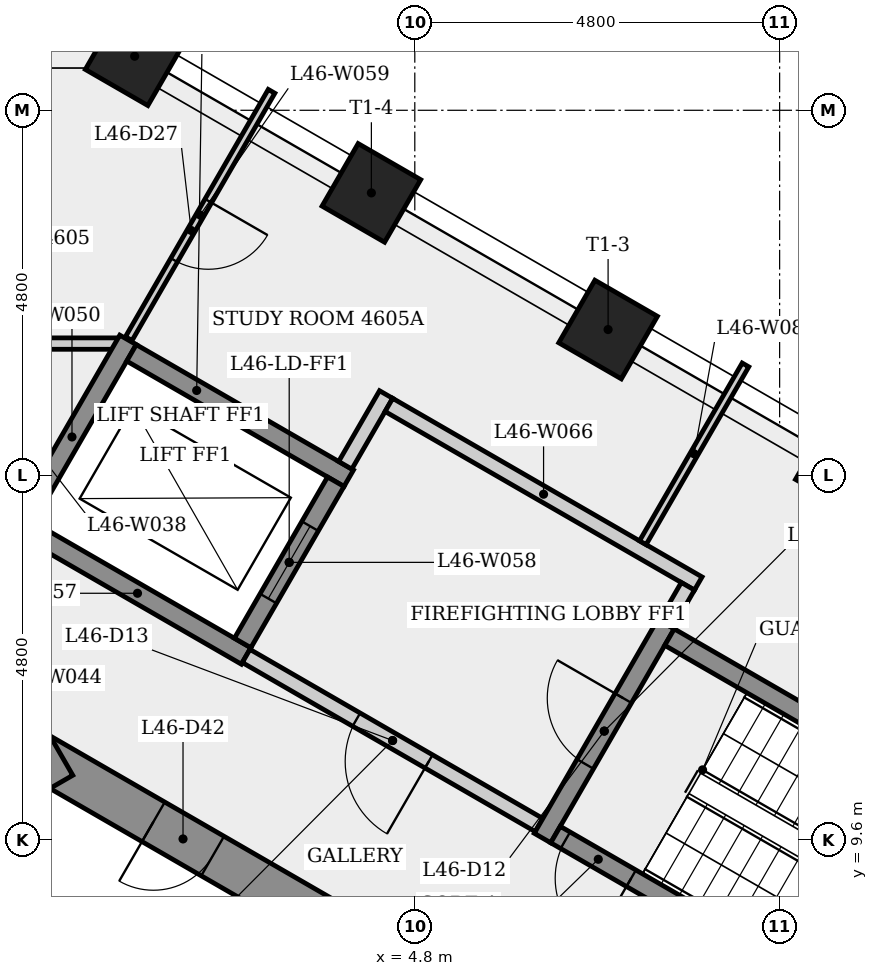
"""IFC4 building model, lengths in metres.
Left out: names, types, materials, properties, quantities, classifications, styles, units other than length and angle.
Written with IfcOpenShell. Run it as: python <this file> out.ifc"""

import sys

from ifc_helpers import new_model, si_unit, direction, frame, frame_2d, origin, origin_2d, place, context, subcontext, project, spatial, rectangle, extrude, element, fill, save


model = new_model("IFC4")
c1 = context("Model", 3, precision=1e-05, world=origin(), true_north=direction((0.0, 1.0)))
c2 = subcontext(c1, "Body", "Model", "MODEL_VIEW")
j1 = project(units=[si_unit("LENGTHUNIT", "METRE"), si_unit("PLANEANGLEUNIT", "RADIAN")], contexts=[c1])
p1 = place(None, origin())
s1 = spatial("IfcSite", under=j1, at=p1, CompositionType="ELEMENT")
p2 = place(p1, origin())
s2 = spatial("IfcBuilding", under=s1, at=p2, CompositionType="ELEMENT")
p3 = place(p2, frame((0.0, 0.0, 173.1)))
s3 = spatial("IfcBuildingStorey", under=s2, at=p3, CompositionType="ELEMENT", Elevation=173.1)
p4 = place(p3, frame((9.35, 5.225, 0.0), z_axis=(0.0, 0.0, 1.0), x_axis=(-0.866023993627, 0.500002442456, 0.0)))
e1 = element("IfcWall", 1, at=p4, inside=s3, PredefinedType="SHEAR", context=c2, shape_type="SweptSolid", body=[
    extrude(rectangle(XDim=10.97, YDim=0.6, at=frame_2d((5.485, 0.0))), origin(), (0.0, 0.0, 1.0), 3.4),
])
p5 = place(p4, frame((8.325, 0.0, 0.0)))
e2 = element("IfcOpeningElement", 2, at=p5, cuts=e1, PredefinedType="OPENING", context=c2, shape_type="SweptSolid", body=[
    extrude(rectangle(XDim=0.9, YDim=2.1, at=frame_2d((0.45, 1.05))), frame((0.0, 0.31, 0.0), z_axis=(0.0, -1.0, 0.0), x_axis=(1.0, 0.0, 0.0)), (0.0, 0.0, 1.0), 0.62),
])
p6 = place(p4, frame((1.518, 0.0, 0.0)))
e3 = element("IfcOpeningElement", 3, at=p6, cuts=e1, PredefinedType="OPENING", context=c2, shape_type="SweptSolid", body=[
    extrude(rectangle(XDim=0.9, YDim=2.1, at=frame_2d((0.45, 1.05))), frame((0.0, 0.31, 0.0), z_axis=(0.0, -1.0, 0.0), x_axis=(1.0, 0.0, 0.0)), (0.0, 0.0, 1.0), 0.62),
])
p7 = place(p3, frame((0.15, 10.71, 0.0), z_axis=(0.0, 0.0, 1.0), x_axis=(-0.866023993627, -0.500002442456, 0.0)))
e4 = element("IfcWall", 4, at=p7, inside=s3, PredefinedType="SHEAR", context=c2, shape_type="SweptSolid", body=[
    extrude(rectangle(XDim=10.97, YDim=0.6, at=frame_2d((5.485, 0.0))), origin(), (0.0, 0.0, 1.0), 3.4),
])
p8 = place(p7, frame((9.013, 0.0, 0.0)))
e5 = element("IfcOpeningElement", 5, at=p8, cuts=e4, PredefinedType="OPENING", context=c2, shape_type="SweptSolid", body=[
    extrude(rectangle(XDim=0.9, YDim=2.1, at=frame_2d((0.45, 1.05))), frame((0.0, 0.31, 0.0), z_axis=(0.0, -1.0, 0.0), x_axis=(1.0, 0.0, 0.0)), (0.0, 0.0, 1.0), 0.62),
])
p9 = place(p7, frame((2.437, 0.0, 0.0)))
e6 = element("IfcOpeningElement", 6, at=p9, cuts=e4, PredefinedType="OPENING", context=c2, shape_type="SweptSolid", body=[
    extrude(rectangle(XDim=0.9, YDim=2.1, at=frame_2d((0.45, 1.05))), frame((0.0, 0.31, 0.0), z_axis=(0.0, -1.0, 0.0), x_axis=(1.0, 0.0, 0.0)), (0.0, 0.0, 1.0), 0.62),
])
for number, where, z_axis, x_axis in (
    (7, (10.458, 14.517, 0.0), (0.0, 0.0, 1.0), (0.5, 0.866, 0.0)),
    (8, (7.343, 16.315, 0.0), (0.0, 0.0, 1.0), (0.5, 0.866, 0.0)),
    (9, (4.229, 18.113, 0.0), (0.0, 0.0, 1.0), (0.5, 0.866, 0.0)),
    (10, (1.114, 19.911, 0.0), (0.0, 0.0, 1.0), (0.5, 0.866, 0.0)),
):
    element("IfcColumn", number, at=place(p3, frame(where, z_axis=z_axis, x_axis=x_axis)), inside=s3, PredefinedType="COLUMN", context=c2, shape_type="SweptSolid", body=[
        extrude(rectangle(XDim=0.95, YDim=0.95, at=origin_2d()), origin(), (0.0, 0.0, 1.0), 3.4),
    ])
p10 = place(p3, frame((-3.598, 16.13, 0.0), z_axis=(0.0, 0.0, 1.0), x_axis=(1.0, 0.0, 0.0)))
e11 = element("IfcWall", 11, at=p10, inside=s3, PredefinedType="PARTITIONING", context=c2, shape_type="SweptSolid", body=[
    extrude(rectangle(XDim=4.672, YDim=0.15, at=frame_2d((2.336, 0.0))), origin(), (0.0, 0.0, 1.0), 3.05),
])
p11 = place(p10, frame((1.836, 0.0, 0.0)))
e12 = element("IfcOpeningElement", 12, at=p11, cuts=e11, PredefinedType="OPENING", context=c2, shape_type="SweptSolid", body=[
    extrude(rectangle(XDim=1.0, YDim=2.1, at=frame_2d((0.5, 1.05))), frame((0.0, 0.085, 0.0), z_axis=(0.0, -1.0, 0.0), x_axis=(1.0, 0.0, 0.0)), (0.0, 0.0, 1.0), 0.17),
])
p12 = place(p3, frame((-0.448, 13.624, 0.0), z_axis=(0.0, 0.0, 1.0), x_axis=(0.500037662692, 0.866003658127, 0.0)))
e13 = element("IfcWall", 13, at=p12, inside=s3, PredefinedType="SHEAR", context=c2, shape_type="SweptSolid", body=[
    extrude(rectangle(XDim=2.95, YDim=0.25, at=frame_2d((1.475, 0.0))), origin(), (0.0, 0.0, 1.0), 3.05),
])
for number, where, z_axis, x_axis in (
    (14, (1.073, 16.008, 0.0), (0.0, 0.0, 1.0), (0.866, -0.5, 0.0)),
    (15, (2.581, 12.02, 0.0), (0.0, 0.0, 1.0), (-0.866, 0.5, 0.0)),
):
    element("IfcWall", number, at=place(p3, frame(where, z_axis=z_axis, x_axis=x_axis)), inside=s3, PredefinedType="SHEAR", context=c2, shape_type="SweptSolid", body=[
        extrude(rectangle(XDim=3.3, YDim=0.25, at=frame_2d((1.65, 0.0))), origin(), (0.0, 0.0, 1.0), 3.05),
    ])
p13 = place(p3, frame((2.535, 12.191, 0.0), z_axis=(0.0, 0.0, 1.0), x_axis=(0.500061746146, 0.865989751695, 0.0)))
e16 = element("IfcWall", 16, at=p13, inside=s3, PredefinedType="SHEAR", context=c2, shape_type="SweptSolid", body=[
    extrude(rectangle(XDim=2.45, YDim=0.25, at=frame_2d((1.225, 0.0))), origin(), (0.0, 0.0, 1.0), 3.4),
])
p14 = place(p13, frame((0.675, 0.0, 0.0)))
e17 = element("IfcOpeningElement", 17, at=p14, cuts=e16, PredefinedType="OPENING", context=c2, shape_type="SweptSolid", body=[
    extrude(rectangle(XDim=1.1, YDim=2.1, at=frame_2d((0.55, 1.05))), frame((0.0, 0.135, 0.0), z_axis=(0.0, -1.0, 0.0), x_axis=(1.0, 0.0, 0.0)), (0.0, 0.0, 1.0), 0.27),
])
p15 = place(p3, frame((2.915, 19.449, 0.0), z_axis=(0.0, 0.0, 1.0), x_axis=(-0.499975549825, -0.866039519639, 0.0)))
e18 = element("IfcWall", 18, at=p15, inside=s3, PredefinedType="PARTITIONING", context=c2, shape_type="SweptSolid", body=[
    extrude(rectangle(XDim=3.758, YDim=0.1, at=frame_2d((1.879, 0.0))), origin(), (0.0, 0.0, 1.0), 3.05),
])
p16 = place(p15, frame((1.664, 0.0, 0.0)))
e19 = element("IfcOpeningElement", 19, at=p16, cuts=e18, PredefinedType="OPENING", context=c2, shape_type="SweptSolid", body=[
    extrude(rectangle(XDim=0.9, YDim=2.1, at=frame_2d((0.45, 1.05))), frame((0.0, 0.06, 0.0), z_axis=(0.0, -1.0, 0.0), x_axis=(1.0, 0.0, 0.0)), (0.0, 0.0, 1.0), 0.12),
])
p17 = place(p3, frame((3.885, 14.529, 0.0), z_axis=(0.0, 0.0, 1.0), x_axis=(0.499997628298, 0.866026773083, 0.0)))
e20 = element("IfcWall", 20, at=p17, inside=s3, PredefinedType="PARTITIONING", context=c2, shape_type="SweptSolid", body=[
    extrude(rectangle(XDim=1.075, YDim=0.2, at=frame_2d((0.538, 0.0))), origin(), (0.0, 0.0, 1.0), 3.05),
])
p18 = place(p3, frame((4.459, 15.323, 0.0), z_axis=(0.0, 0.0, 1.0), x_axis=(0.866016039709, -0.500016218704, 0.0)))
e21 = element("IfcWall", 21, at=p18, inside=s3, PredefinedType="PARTITIONING", context=c2, shape_type="SweptSolid", body=[
    extrude(rectangle(XDim=4.7, YDim=0.2, at=frame_2d((2.35, 0.0))), origin(), (0.0, 0.0, 1.0), 3.05),
])
p19 = place(p3, frame((6.435, 9.795, 0.0), z_axis=(0.0, 0.0, 1.0), x_axis=(-0.866012907634, 0.500021643343, 0.0)))
e22 = element("IfcWall", 22, at=p19, inside=s3, PredefinedType="PARTITIONING", context=c2, shape_type="SweptSolid", body=[
    extrude(rectangle(XDim=4.45, YDim=0.2, at=frame_2d((2.225, 0.0))), origin(), (0.0, 0.0, 1.0), 3.05),
])
p20 = place(p19, frame((1.675, 0.0, 0.0)))
e23 = element("IfcOpeningElement", 23, at=p20, cuts=e22, PredefinedType="OPENING", context=c2, shape_type="SweptSolid", body=[
    extrude(rectangle(XDim=1.1, YDim=2.1, at=frame_2d((0.55, 1.05))), frame((0.0, 0.11, 0.0), z_axis=(0.0, -1.0, 0.0), x_axis=(1.0, 0.0, 0.0)), (0.0, 0.0, 1.0), 0.22),
])
p21 = place(p3, frame((6.48, 9.624, 0.0), z_axis=(0.0, 0.0, 1.0), x_axis=(0.500017246033, 0.866015446554, 0.0)))
e24 = element("IfcWall", 24, at=p21, inside=s3, PredefinedType="SHEAR", context=c2, shape_type="SweptSolid", body=[
    extrude(rectangle(XDim=3.25, YDim=0.25, at=frame_2d((1.625, 0.0))), origin(), (0.0, 0.0, 1.0), 3.05),
])
p22 = place(p21, frame((1.125, 0.0, 0.0)))
e25 = element("IfcOpeningElement", 25, at=p22, cuts=e24, PredefinedType="OPENING", context=c2, shape_type="SweptSolid", body=[
    extrude(rectangle(XDim=1.0, YDim=2.1, at=frame_2d((0.5, 1.05))), frame((0.0, 0.135, 0.0), z_axis=(0.0, -1.0, 0.0), x_axis=(1.0, 0.0, 0.0)), (0.0, 0.0, 1.0), 0.27),
])
p23 = place(p3, frame((7.8, 13.51, 0.0), z_axis=(0.0, 0.0, 1.0), x_axis=(0.499949324397, 0.866054659381, 0.0)))
e26 = element("IfcWall", 26, at=p23, inside=s3, PredefinedType="PARTITIONING", context=c2, shape_type="SweptSolid", body=[
    extrude(rectangle(XDim=2.701, YDim=0.1, at=frame_2d((1.351, 0.0))), origin(), (0.0, 0.0, 1.0), 3.05),
])
p24 = place(p3, frame((8.151, 12.268, 0.0), z_axis=(0.0, 0.0, 1.0), x_axis=(0.866025499775, -0.499999833739, 0.0)))
e27 = element("IfcWall", 27, at=p24, inside=s3, PredefinedType="SHEAR", context=c2, shape_type="SweptSolid", body=[
    extrude(rectangle(XDim=6.4, YDim=0.25, at=frame_2d((3.2, 0.0))), origin(), (0.0, 0.0, 1.0), 3.05),
])
p25 = place(p3, frame((8.393, 12.937, 0.0), z_axis=(0.0, 0.0, 1.0), x_axis=(-0.500065409566, -0.86598763626, 0.0)))
e28 = element("IfcWall", 28, at=p25, inside=s3, PredefinedType="PARTITIONING", context=c2, shape_type="SweptSolid", body=[
    extrude(rectangle(XDim=0.575, YDim=0.2, at=frame_2d((0.288, 0.0))), origin(), (0.0, 0.0, 1.0), 3.05),
])
p26 = place(p3, frame((12.194, 6.47, 0.0), z_axis=(0.0, 0.0, 1.0), x_axis=(-0.866025499775, 0.499999833739, 0.0)))
e29 = element("IfcWall", 29, at=p26, inside=s3, PredefinedType="SHEAR", context=c2, shape_type="SweptSolid", body=[
    extrude(rectangle(XDim=6.4, YDim=0.25, at=frame_2d((3.2, 0.0))), origin(), (0.0, 0.0, 1.0), 3.05),
])
p27 = place(p26, frame((5.25, 0.0, 0.0)))
e30 = element("IfcOpeningElement", 30, at=p27, cuts=e29, PredefinedType="OPENING", context=c2, shape_type="SweptSolid", body=[
    extrude(rectangle(XDim=1.0, YDim=2.1, at=frame_2d((0.5, 1.05))), frame((0.0, 0.135, 0.0), z_axis=(0.0, -1.0, 0.0), x_axis=(1.0, 0.0, 0.0)), (0.0, 0.0, 1.0), 0.27),
])
p28 = place(p27, origin())
e31 = element("IfcDoor", 31, at=p28, inside=s3, OperationType="SINGLE_SWING_LEFT", PredefinedType="DOOR", context=c2, shape_type="SweptSolid", body=[
    extrude(rectangle(XDim=1.0, YDim=2.1, at=frame_2d((0.5, 1.05))), frame((0.0, 0.025, 0.0), z_axis=(0.0, -1.0, 0.0), x_axis=(1.0, 0.0, 0.0)), (0.0, 0.0, 1.0), 0.05),
])
fill(e30, e31)
p29 = place(p22, origin())
e32 = element("IfcDoor", 32, at=p29, inside=s3, OperationType="SINGLE_SWING_RIGHT", PredefinedType="DOOR", context=c2, shape_type="SweptSolid", body=[
    extrude(rectangle(XDim=1.0, YDim=2.1, at=frame_2d((0.5, 1.05))), frame((0.0, 0.025, 0.0), z_axis=(0.0, -1.0, 0.0), x_axis=(1.0, 0.0, 0.0)), (0.0, 0.0, 1.0), 0.05),
])
fill(e25, e32)
p30 = place(p20, origin())
e33 = element("IfcDoor", 33, at=p30, inside=s3, OperationType="SINGLE_SWING_LEFT", PredefinedType="DOOR", context=c2, shape_type="SweptSolid", body=[
    extrude(rectangle(XDim=1.1, YDim=2.1, at=frame_2d((0.55, 1.05))), frame((0.0, 0.025, 0.0), z_axis=(0.0, -1.0, 0.0), x_axis=(1.0, 0.0, 0.0)), (0.0, 0.0, 1.0), 0.05),
])
fill(e23, e33)
p31 = place(p14, origin())
e34 = element("IfcDoor", 34, at=p31, inside=s3, OperationType="SLIDING_TO_LEFT", PredefinedType="DOOR", context=c2, shape_type="SweptSolid", body=[
    extrude(rectangle(XDim=1.1, YDim=2.1, at=frame_2d((0.55, 1.05))), frame((0.0, 0.025, 0.0), z_axis=(0.0, -1.0, 0.0), x_axis=(1.0, 0.0, 0.0)), (0.0, 0.0, 1.0), 0.05),
])
fill(e17, e34)
p32 = place(p16, origin())
e35 = element("IfcDoor", 35, at=p32, inside=s3, OperationType="SINGLE_SWING_LEFT", PredefinedType="DOOR", context=c2, shape_type="SweptSolid", body=[
    extrude(rectangle(XDim=0.9, YDim=2.1, at=frame_2d((0.45, 1.05))), frame((0.0, 0.025, 0.0), z_axis=(0.0, -1.0, 0.0), x_axis=(1.0, 0.0, 0.0)), (0.0, 0.0, 1.0), 0.05),
])
fill(e19, e35)
p33 = place(p5, origin())
e36 = element("IfcDoor", 36, at=p33, inside=s3, OperationType="SINGLE_SWING_RIGHT", PredefinedType="DOOR", context=c2, shape_type="SweptSolid", body=[
    extrude(rectangle(XDim=0.9, YDim=2.1, at=frame_2d((0.45, 1.05))), frame((0.0, 0.025, 0.0), z_axis=(0.0, -1.0, 0.0), x_axis=(1.0, 0.0, 0.0)), (0.0, 0.0, 1.0), 0.05),
])
fill(e2, e36)
save(model, sys.argv[1])
